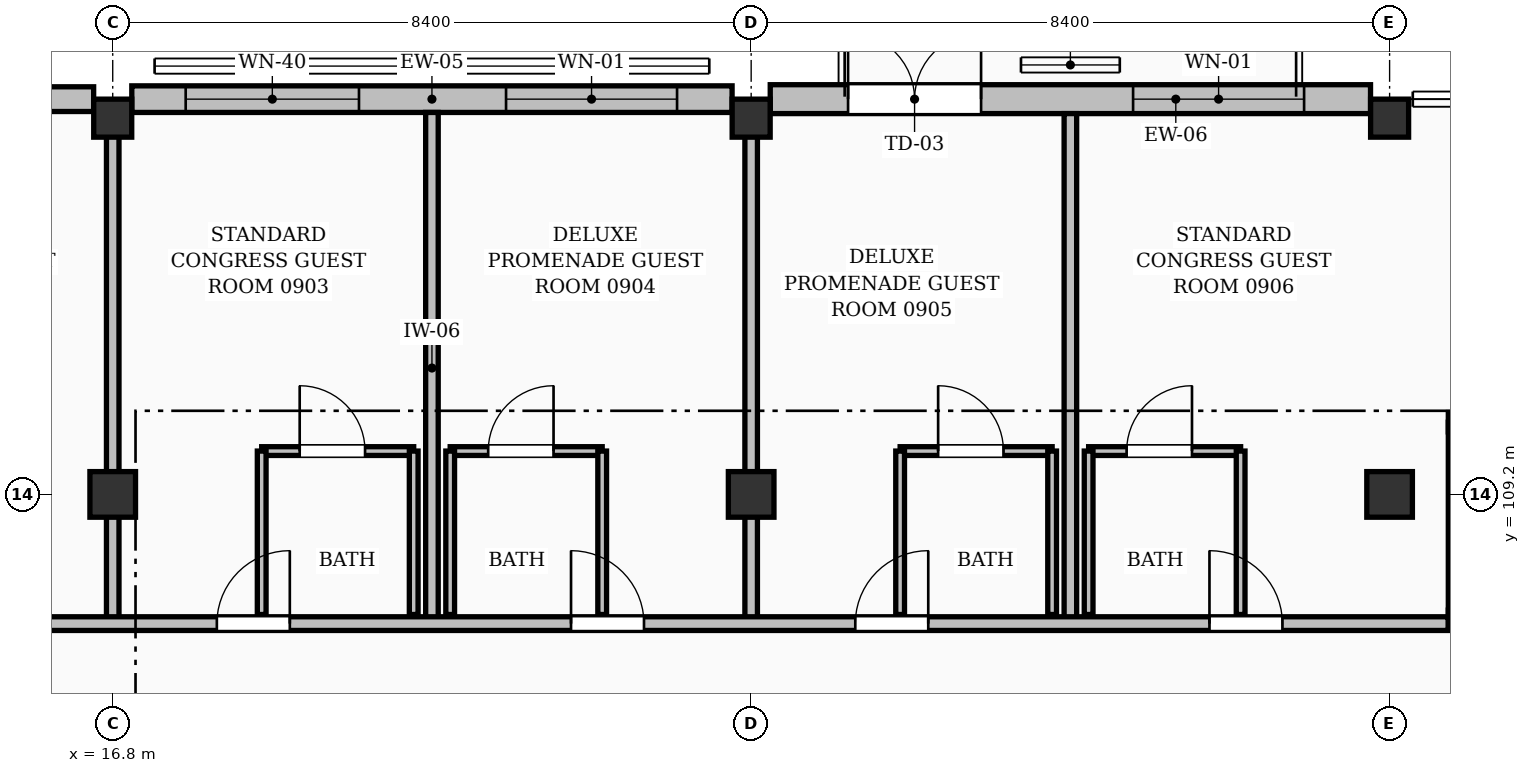
"""IFC4 building model, lengths in metres.
Left out: names, types, materials, properties, quantities, classifications, styles, units other than length and angle.
Written with IfcOpenShell. Run it as: python <this file> out.ifc"""

import sys

from ifc_helpers import new_model, si_unit, direction, frame, frame_2d, origin, origin_2d, place, context, subcontext, project, spatial, rectangle, extrude, element, fill, save


model = new_model("IFC4")
c1 = context("Model", 3, precision=1e-05, world=origin(), true_north=direction((0.0, 1.0)))
c2 = subcontext(c1, "Body", "Model", "MODEL_VIEW")
j1 = project(units=[si_unit("LENGTHUNIT", "METRE"), si_unit("PLANEANGLEUNIT", "RADIAN")], contexts=[c1])
p1 = place(None, origin())
s1 = spatial("IfcSite", under=j1, at=p1, CompositionType="ELEMENT")
p2 = place(p1, origin())
s2 = spatial("IfcBuilding", under=s1, at=p2, CompositionType="ELEMENT")
p3 = place(p2, frame((0.0, 0.0, 31.92)))
s3 = spatial("IfcBuildingStorey", under=s2, at=p3, CompositionType="ELEMENT", Elevation=31.92)
p4 = place(p3, frame((16.8, 109.2, 0.0), z_axis=(0.0, 0.0, 1.0), x_axis=(1.0, 0.0, 0.0)))
e1 = element("IfcColumn", 1, at=p4, inside=s3, PredefinedType="COLUMN", context=c2, shape_type="SweptSolid", body=[
    extrude(rectangle(XDim=0.6, YDim=0.6, at=origin_2d()), origin(), (0.0, 0.0, 1.0), 3.36),
])
p5 = place(p3, frame((16.8, 114.15, 0.0), z_axis=(0.0, 0.0, 1.0), x_axis=(1.0, 0.0, 0.0)))
e2 = element("IfcColumn", 2, at=p5, inside=s3, PredefinedType="COLUMN", context=c2, shape_type="SweptSolid", body=[
    extrude(rectangle(XDim=0.5, YDim=0.5, at=origin_2d()), origin(), (0.0, 0.0, 1.0), 3.36),
])
p6 = place(p3, frame((25.2, 109.2, 0.0), z_axis=(0.0, 0.0, 1.0), x_axis=(1.0, 0.0, 0.0)))
e3 = element("IfcColumn", 3, at=p6, inside=s3, PredefinedType="COLUMN", context=c2, shape_type="SweptSolid", body=[
    extrude(rectangle(XDim=0.6, YDim=0.6, at=origin_2d()), origin(), (0.0, 0.0, 1.0), 3.36),
])
p7 = place(p3, frame((25.2, 114.15, 0.0), z_axis=(0.0, 0.0, 1.0), x_axis=(1.0, 0.0, 0.0)))
e4 = element("IfcColumn", 4, at=p7, inside=s3, PredefinedType="COLUMN", context=c2, shape_type="SweptSolid", body=[
    extrude(rectangle(XDim=0.5, YDim=0.5, at=origin_2d()), origin(), (0.0, 0.0, 1.0), 3.36),
])
p8 = place(p3, frame((33.6, 109.2, 0.0), z_axis=(0.0, 0.0, 1.0), x_axis=(1.0, 0.0, 0.0)))
e5 = element("IfcColumn", 5, at=p8, inside=s3, PredefinedType="COLUMN", context=c2, shape_type="SweptSolid", body=[
    extrude(rectangle(XDim=0.6, YDim=0.6, at=origin_2d()), origin(), (0.0, 0.0, 1.0), 3.36),
])
p9 = place(p3, frame((33.6, 114.15, 0.0), z_axis=(0.0, 0.0, 1.0), x_axis=(1.0, 0.0, 0.0)))
e6 = element("IfcColumn", 6, at=p9, inside=s3, PredefinedType="COLUMN", context=c2, shape_type="SweptSolid", body=[
    extrude(rectangle(XDim=0.5, YDim=0.5, at=origin_2d()), origin(), (0.0, 0.0, 1.0), 3.36),
])
p10 = place(p3, frame((8.651, 114.4, 0.0), z_axis=(0.0, 0.0, 1.0), x_axis=(1.0, 0.0, 0.0)))
e7 = element("IfcWall", 7, at=p10, inside=s3, PredefinedType="SOLIDWALL", context=c2, shape_type="SweptSolid", body=[
    extrude(rectangle(XDim=7.898, YDim=0.325, at=frame_2d((3.949, 0.0))), origin(), (0.0, 0.0, 1.0), 2.474),
])
p11 = place(p10, frame((1.074, 0.0, 0.0)))
e8 = element("IfcOpeningElement", 8, at=p11, cuts=e7, PredefinedType="OPENING", context=c2, shape_type="SweptSolid", body=[
    extrude(rectangle(XDim=1.65, YDim=2.08, at=frame_2d((0.825, 1.04))), frame((0.0, 0.172, 0.0), z_axis=(0.0, -1.0, 0.0), x_axis=(1.0, 0.0, 0.0)), (0.0, 0.0, 1.0), 0.345),
])
p12 = place(p10, frame((4.689, 0.0, 0.25)))
e9 = element("IfcOpeningElement", 9, at=p12, cuts=e7, PredefinedType="OPENING", context=c2, shape_type="SweptSolid", body=[
    extrude(rectangle(XDim=2.42, YDim=1.9, at=frame_2d((1.21, 0.95))), frame((0.0, 0.172, 0.0), z_axis=(0.0, -1.0, 0.0), x_axis=(1.0, 0.0, 0.0)), (0.0, 0.0, 1.0), 0.345),
])
p13 = place(p3, frame((17.051, 114.4, 0.0), z_axis=(0.0, 0.0, 1.0), x_axis=(1.0, 0.0, 0.0)))
e10 = element("IfcWall", 10, at=p13, inside=s3, PredefinedType="SOLIDWALL", context=c2, shape_type="SweptSolid", body=[
    extrude(rectangle(XDim=7.898, YDim=0.35, at=frame_2d((3.949, 0.0))), origin(), (0.0, 0.0, 1.0), 2.474),
])
p14 = place(p13, frame((0.709, 0.0, 0.25)))
e11 = element("IfcOpeningElement", 11, at=p14, cuts=e10, PredefinedType="OPENING", context=c2, shape_type="SweptSolid", body=[
    extrude(rectangle(XDim=2.28, YDim=2.0, at=frame_2d((1.14, 1.0))), frame((0.0, 0.185, 0.0), z_axis=(0.0, -1.0, 0.0), x_axis=(1.0, 0.0, 0.0)), (0.0, 0.0, 1.0), 0.37),
])
p15 = place(p13, frame((4.924, 0.0, 0.25)))
e12 = element("IfcOpeningElement", 12, at=p15, cuts=e10, PredefinedType="OPENING", context=c2, shape_type="SweptSolid", body=[
    extrude(rectangle(XDim=2.25, YDim=1.85, at=frame_2d((1.125, 0.925))), frame((0.0, 0.185, 0.0), z_axis=(0.0, -1.0, 0.0), x_axis=(1.0, 0.0, 0.0)), (0.0, 0.0, 1.0), 0.37),
])
p16 = place(p3, frame((25.451, 114.4, 0.0), z_axis=(0.0, 0.0, 1.0), x_axis=(1.0, 0.0, 0.0)))
e13 = element("IfcWall", 13, at=p16, inside=s3, PredefinedType="SOLIDWALL", context=c2, shape_type="SweptSolid", body=[
    extrude(rectangle(XDim=7.898, YDim=0.38, at=frame_2d((3.949, 0.0))), origin(), (0.0, 0.0, 1.0), 2.474),
])
p17 = place(p16, frame((1.024, 0.0, 0.0)))
e14 = element("IfcOpeningElement", 14, at=p17, cuts=e13, PredefinedType="OPENING", context=c2, shape_type="SweptSolid", body=[
    extrude(rectangle(XDim=1.75, YDim=2.08, at=frame_2d((0.875, 1.04))), frame((0.0, 0.2, 0.0), z_axis=(0.0, -1.0, 0.0), x_axis=(1.0, 0.0, 0.0)), (0.0, 0.0, 1.0), 0.4),
])
p18 = place(p16, frame((4.774, 0.0, 0.25)))
e15 = element("IfcOpeningElement", 15, at=p18, cuts=e13, PredefinedType="OPENING", context=c2, shape_type="SweptSolid", body=[
    extrude(rectangle(XDim=2.25, YDim=1.85, at=frame_2d((1.125, 0.925))), frame((0.0, 0.2, 0.0), z_axis=(0.0, -1.0, 0.0), x_axis=(1.0, 0.0, 0.0)), (0.0, 0.0, 1.0), 0.4),
])
p19 = place(p3, frame((34.373, 107.55, 0.0), z_axis=(0.0, 0.0, 1.0), x_axis=(1.0, 0.0, 0.0)))
e16 = element("IfcWall", 16, at=p19, inside=s3, PredefinedType="SOLIDWALL", context=c2, shape_type="SweptSolid", body=[
    extrude(rectangle(XDim=2.455, YDim=0.255, at=frame_2d((1.228, 0.0))), origin(), (0.0, 0.0, 1.0), 3.1),
])
p20 = place(p19, frame((0.677, 0.0, 0.0)))
e17 = element("IfcOpeningElement", 17, at=p20, cuts=e16, PredefinedType="OPENING", context=c2, shape_type="SweptSolid", body=[
    extrude(rectangle(XDim=1.1, YDim=2.15, at=frame_2d((0.55, 1.075))), frame((0.0, 0.137, 0.0), z_axis=(0.0, -1.0, 0.0), x_axis=(1.0, 0.0, 0.0)), (0.0, 0.0, 1.0), 0.275),
])
p21 = place(p3, frame((34.373, 110.15, 0.0), z_axis=(0.0, 0.0, 1.0), x_axis=(1.0, 0.0, 0.0)))
e18 = element("IfcWall", 18, at=p21, inside=s3, PredefinedType="SOLIDWALL", context=c2, shape_type="SweptSolid", body=[
    extrude(rectangle(XDim=2.455, YDim=0.255, at=frame_2d((1.228, 0.0))), origin(), (0.0, 0.0, 1.0), 3.1),
])
p22 = place(p3, frame((34.5, 107.55, 0.0), z_axis=(0.0, 0.0, 1.0), x_axis=(0.0, 1.0, 0.0)))
e19 = element("IfcWall", 19, at=p22, inside=s3, PredefinedType="SOLIDWALL", context=c2, shape_type="SweptSolid", body=[
    extrude(rectangle(XDim=2.6, YDim=0.255, at=frame_2d((1.3, 0.0))), origin(), (0.0, 0.0, 1.0), 3.1),
])
p23 = place(p3, frame((18.76, 109.77, 0.0), z_axis=(0.0, 0.0, 1.0), x_axis=(1.0, 0.0, 0.0)))
e20 = element("IfcWall", 20, at=p23, inside=s3, PredefinedType="PARTITIONING", context=c2, shape_type="SweptSolid", body=[
    extrude(rectangle(XDim=2.0, YDim=0.115, at=frame_2d((1.0, 0.0))), origin(), (0.0, 0.0, 1.0), 3.1),
])
p24 = place(p23, frame((0.5, 0.0, 0.0)))
e21 = element("IfcOpeningElement", 21, at=p24, cuts=e20, PredefinedType="OPENING", context=c2, shape_type="SweptSolid", body=[
    extrude(rectangle(XDim=0.86, YDim=2.05, at=frame_2d((0.43, 1.025))), frame((0.0, 0.067, 0.0), z_axis=(0.0, -1.0, 0.0), x_axis=(1.0, 0.0, 0.0)), (0.0, 0.0, 1.0), 0.135),
])
p25 = place(p3, frame((18.76, 107.62, 0.0), z_axis=(0.0, 0.0, 1.0), x_axis=(0.0, 1.0, 0.0)))
e22 = element("IfcWall", 22, at=p25, inside=s3, PredefinedType="PARTITIONING", context=c2, shape_type="SweptSolid", body=[
    extrude(rectangle(XDim=2.15, YDim=0.115, at=frame_2d((1.075, 0.0))), origin(), (0.0, 0.0, 1.0), 2.622),
])
p26 = place(p3, frame((20.76, 107.62, 0.0), z_axis=(0.0, 0.0, 1.0), x_axis=(0.0, 1.0, 0.0)))
e23 = element("IfcWall", 23, at=p26, inside=s3, PredefinedType="PARTITIONING", context=c2, shape_type="SweptSolid", body=[
    extrude(rectangle(XDim=2.15, YDim=0.115, at=frame_2d((1.075, 0.0))), origin(), (0.0, 0.0, 1.0), 3.1),
])
p27 = place(p3, frame((21.24, 109.77, 0.0), z_axis=(0.0, 0.0, 1.0), x_axis=(1.0, 0.0, 0.0)))
e24 = element("IfcWall", 24, at=p27, inside=s3, PredefinedType="PARTITIONING", context=c2, shape_type="SweptSolid", body=[
    extrude(rectangle(XDim=2.0, YDim=0.115, at=frame_2d((1.0, 0.0))), origin(), (0.0, 0.0, 1.0), 3.1),
])
p28 = place(p27, frame((0.5, 0.0, 0.0)))
e25 = element("IfcOpeningElement", 25, at=p28, cuts=e24, PredefinedType="OPENING", context=c2, shape_type="SweptSolid", body=[
    extrude(rectangle(XDim=0.86, YDim=2.05, at=frame_2d((0.43, 1.025))), frame((0.0, 0.067, 0.0), z_axis=(0.0, -1.0, 0.0), x_axis=(1.0, 0.0, 0.0)), (0.0, 0.0, 1.0), 0.135),
])
p29 = place(p3, frame((21.24, 107.62, 0.0), z_axis=(0.0, 0.0, 1.0), x_axis=(0.0, 1.0, 0.0)))
e26 = element("IfcWall", 26, at=p29, inside=s3, PredefinedType="PARTITIONING", context=c2, shape_type="SweptSolid", body=[
    extrude(rectangle(XDim=2.15, YDim=0.115, at=frame_2d((1.075, 0.0))), origin(), (0.0, 0.0, 1.0), 3.1),
])
p30 = place(p3, frame((23.24, 107.62, 0.0), z_axis=(0.0, 0.0, 1.0), x_axis=(0.0, 1.0, 0.0)))
e27 = element("IfcWall", 27, at=p30, inside=s3, PredefinedType="PARTITIONING", context=c2, shape_type="SweptSolid", body=[
    extrude(rectangle(XDim=2.15, YDim=0.115, at=frame_2d((1.075, 0.0))), origin(), (0.0, 0.0, 1.0), 2.622),
])
p31 = place(p3, frame((21.0, 107.5, 0.0), z_axis=(0.0, 0.0, 1.0), x_axis=(0.0, 1.0, 0.0)))
e28 = element("IfcWall", 28, at=p31, inside=s3, PredefinedType="PARTITIONING", context=c2, shape_type="SweptSolid", body=[
    extrude(rectangle(XDim=6.725, YDim=0.165, at=frame_2d((3.363, 0.0))), origin(), (0.0, 0.0, 1.0), 3.1),
])
p32 = place(p3, frame((16.8, 107.5, 0.0), z_axis=(0.0, 0.0, 1.0), x_axis=(0.0, 1.0, 0.0)))
e29 = element("IfcWall", 29, at=p32, inside=s3, PredefinedType="PARTITIONING", context=c2, shape_type="SweptSolid", body=[
    extrude(rectangle(XDim=6.55, YDim=0.165, at=frame_2d((3.275, 0.0))), origin(), (0.0, 0.0, 1.0), 2.39),
])
p33 = place(p3, frame((27.16, 109.77, 0.0), z_axis=(0.0, 0.0, 1.0), x_axis=(1.0, 0.0, 0.0)))
e30 = element("IfcWall", 30, at=p33, inside=s3, PredefinedType="PARTITIONING", context=c2, shape_type="SweptSolid", body=[
    extrude(rectangle(XDim=2.0, YDim=0.115, at=frame_2d((1.0, 0.0))), origin(), (0.0, 0.0, 1.0), 3.1),
])
p34 = place(p33, frame((0.5, 0.0, 0.0)))
e31 = element("IfcOpeningElement", 31, at=p34, cuts=e30, PredefinedType="OPENING", context=c2, shape_type="SweptSolid", body=[
    extrude(rectangle(XDim=0.86, YDim=2.05, at=frame_2d((0.43, 1.025))), frame((0.0, 0.067, 0.0), z_axis=(0.0, -1.0, 0.0), x_axis=(1.0, 0.0, 0.0)), (0.0, 0.0, 1.0), 0.135),
])
for number, where, z_axis, x_axis in (
    (32, (27.16, 107.62, 0.0), (0.0, 0.0, 1.0), (0.0, 1.0, 0.0)),
    (33, (29.16, 107.62, 0.0), (0.0, 0.0, 1.0), (0.0, 1.0, 0.0)),
):
    element("IfcWall", number, at=place(p3, frame(where, z_axis=z_axis, x_axis=x_axis)), inside=s3, PredefinedType="PARTITIONING", context=c2, shape_type="SweptSolid", body=[
        extrude(rectangle(XDim=2.15, YDim=0.115, at=frame_2d((1.075, 0.0))), origin(), (0.0, 0.0, 1.0), 3.1),
    ])
p35 = place(p3, frame((29.64, 109.77, 0.0), z_axis=(0.0, 0.0, 1.0), x_axis=(1.0, 0.0, 0.0)))
e34 = element("IfcWall", 34, at=p35, inside=s3, PredefinedType="PARTITIONING", context=c2, shape_type="SweptSolid", body=[
    extrude(rectangle(XDim=2.0, YDim=0.115, at=frame_2d((1.0, 0.0))), origin(), (0.0, 0.0, 1.0), 3.1),
])
p36 = place(p35, frame((0.5, 0.0, 0.0)))
e35 = element("IfcOpeningElement", 35, at=p36, cuts=e34, PredefinedType="OPENING", context=c2, shape_type="SweptSolid", body=[
    extrude(rectangle(XDim=0.86, YDim=2.05, at=frame_2d((0.43, 1.025))), frame((0.0, 0.067, 0.0), z_axis=(0.0, -1.0, 0.0), x_axis=(1.0, 0.0, 0.0)), (0.0, 0.0, 1.0), 0.135),
])
for number, where, z_axis, x_axis in (
    (36, (29.64, 107.62, 0.0), (0.0, 0.0, 1.0), (0.0, 1.0, 0.0)),
    (37, (31.64, 107.62, 0.0), (0.0, 0.0, 1.0), (0.0, 1.0, 0.0)),
):
    element("IfcWall", number, at=place(p3, frame(where, z_axis=z_axis, x_axis=x_axis)), inside=s3, PredefinedType="PARTITIONING", context=c2, shape_type="SweptSolid", body=[
        extrude(rectangle(XDim=2.15, YDim=0.115, at=frame_2d((1.075, 0.0))), origin(), (0.0, 0.0, 1.0), 3.1),
    ])
p37 = place(p3, frame((29.4, 107.5, 0.0), z_axis=(0.0, 0.0, 1.0), x_axis=(0.0, 1.0, 0.0)))
e38 = element("IfcWall", 38, at=p37, inside=s3, PredefinedType="PARTITIONING", context=c2, shape_type="SweptSolid", body=[
    extrude(rectangle(XDim=6.71, YDim=0.165, at=frame_2d((3.355, 0.0))), origin(), (0.0, 0.0, 1.0), 3.1),
])
p38 = place(p3, frame((25.2, 107.5, 0.0), z_axis=(0.0, 0.0, 1.0), x_axis=(0.0, 1.0, 0.0)))
e39 = element("IfcWall", 39, at=p38, inside=s3, PredefinedType="PARTITIONING", context=c2, shape_type="SweptSolid", body=[
    extrude(rectangle(XDim=6.55, YDim=0.165, at=frame_2d((3.275, 0.0))), origin(), (0.0, 0.0, 1.0), 2.39),
])
p39 = place(p3, frame((8.575, 107.5, 0.0), z_axis=(0.0, 0.0, 1.0), x_axis=(1.0, 0.0, 0.0)))
e40 = element("IfcWall", 40, at=p39, inside=s3, PredefinedType="PARTITIONING", context=c2, shape_type="SweptSolid", body=[
    extrude(rectangle(XDim=25.795, YDim=0.18, at=frame_2d((12.897, 0.0))), origin(), (0.0, 0.0, 1.0), 3.1),
])
p40 = place(p39, frame((1.195, 0.0, 0.0)))
e41 = element("IfcOpeningElement", 41, at=p40, cuts=e40, PredefinedType="OPENING", context=c2, shape_type="SweptSolid", body=[
    extrude(rectangle(XDim=0.96, YDim=2.15, at=frame_2d((0.48, 1.075))), frame((0.0, 0.1, 0.0), z_axis=(0.0, -1.0, 0.0), x_axis=(1.0, 0.0, 0.0)), (0.0, 0.0, 1.0), 0.2),
])
p41 = place(p39, frame((5.855, 0.0, 0.0)))
e42 = element("IfcOpeningElement", 42, at=p41, cuts=e40, PredefinedType="OPENING", context=c2, shape_type="SweptSolid", body=[
    extrude(rectangle(XDim=0.96, YDim=2.15, at=frame_2d((0.48, 1.075))), frame((0.0, 0.1, 0.0), z_axis=(0.0, -1.0, 0.0), x_axis=(1.0, 0.0, 0.0)), (0.0, 0.0, 1.0), 0.2),
])
p42 = place(p39, frame((9.595, 0.0, 0.0)))
e43 = element("IfcOpeningElement", 43, at=p42, cuts=e40, PredefinedType="OPENING", context=c2, shape_type="SweptSolid", body=[
    extrude(rectangle(XDim=0.96, YDim=2.15, at=frame_2d((0.48, 1.075))), frame((0.0, 0.1, 0.0), z_axis=(0.0, -1.0, 0.0), x_axis=(1.0, 0.0, 0.0)), (0.0, 0.0, 1.0), 0.2),
])
p43 = place(p39, frame((14.255, 0.0, 0.0)))
e44 = element("IfcOpeningElement", 44, at=p43, cuts=e40, PredefinedType="OPENING", context=c2, shape_type="SweptSolid", body=[
    extrude(rectangle(XDim=0.96, YDim=2.15, at=frame_2d((0.48, 1.075))), frame((0.0, 0.1, 0.0), z_axis=(0.0, -1.0, 0.0), x_axis=(1.0, 0.0, 0.0)), (0.0, 0.0, 1.0), 0.2),
])
p44 = place(p39, frame((17.995, 0.0, 0.0)))
e45 = element("IfcOpeningElement", 45, at=p44, cuts=e40, PredefinedType="OPENING", context=c2, shape_type="SweptSolid", body=[
    extrude(rectangle(XDim=0.96, YDim=2.15, at=frame_2d((0.48, 1.075))), frame((0.0, 0.1, 0.0), z_axis=(0.0, -1.0, 0.0), x_axis=(1.0, 0.0, 0.0)), (0.0, 0.0, 1.0), 0.2),
])
p45 = place(p39, frame((22.655, 0.0, 0.0)))
e46 = element("IfcOpeningElement", 46, at=p45, cuts=e40, PredefinedType="OPENING", context=c2, shape_type="SweptSolid", body=[
    extrude(rectangle(XDim=0.96, YDim=2.15, at=frame_2d((0.48, 1.075))), frame((0.0, 0.1, 0.0), z_axis=(0.0, -1.0, 0.0), x_axis=(1.0, 0.0, 0.0)), (0.0, 0.0, 1.0), 0.2),
])
p46 = place(p14, origin())
e47 = element("IfcWindow", 47, at=p46, inside=s3, PartitioningType="DOUBLE_PANEL_VERTICAL", PredefinedType="WINDOW", context=c2, shape_type="SweptSolid", body=[
    extrude(rectangle(XDim=2.28, YDim=2.0, at=frame_2d((1.14, 1.0))), frame((0.0, 0.03, 0.0), z_axis=(0.0, -1.0, 0.0), x_axis=(1.0, 0.0, 0.0)), (0.0, 0.0, 1.0), 0.06),
])
fill(e11, e47)
p47 = place(p15, origin())
e48 = element("IfcWindow", 48, at=p47, inside=s3, PartitioningType="DOUBLE_PANEL_VERTICAL", PredefinedType="WINDOW", context=c2, shape_type="SweptSolid", body=[
    extrude(rectangle(XDim=2.25, YDim=1.85, at=frame_2d((1.125, 0.925))), frame((0.0, 0.03, 0.0), z_axis=(0.0, -1.0, 0.0), x_axis=(1.0, 0.0, 0.0)), (0.0, 0.0, 1.0), 0.06),
])
fill(e12, e48)
p48 = place(p17, origin())
e49 = element("IfcDoor", 49, at=p48, inside=s3, OperationType="DOUBLE_DOOR_SINGLE_SWING", PredefinedType="DOOR", context=c2, shape_type="SweptSolid", body=[
    extrude(rectangle(XDim=1.75, YDim=2.08, at=frame_2d((0.875, 1.04))), frame((0.0, 0.025, 0.0), z_axis=(0.0, -1.0, 0.0), x_axis=(1.0, 0.0, 0.0)), (0.0, 0.0, 1.0), 0.05),
])
fill(e14, e49)
p49 = place(p18, origin())
e50 = element("IfcWindow", 50, at=p49, inside=s3, PartitioningType="DOUBLE_PANEL_VERTICAL", PredefinedType="WINDOW", context=c2, shape_type="SweptSolid", body=[
    extrude(rectangle(XDim=2.25, YDim=1.85, at=frame_2d((1.125, 0.925))), frame((0.0, 0.03, 0.0), z_axis=(0.0, -1.0, 0.0), x_axis=(1.0, 0.0, 0.0)), (0.0, 0.0, 1.0), 0.06),
])
fill(e15, e50)
p50 = place(p24, origin())
e51 = element("IfcDoor", 51, at=p50, inside=s3, OperationType="SINGLE_SWING_LEFT", PredefinedType="DOOR", context=c2, shape_type="SweptSolid", body=[
    extrude(rectangle(XDim=0.86, YDim=2.05, at=frame_2d((0.43, 1.025))), frame((0.0, 0.025, 0.0), z_axis=(0.0, -1.0, 0.0), x_axis=(1.0, 0.0, 0.0)), (0.0, 0.0, 1.0), 0.05),
])
fill(e21, e51)
p51 = place(p28, origin())
e52 = element("IfcDoor", 52, at=p51, inside=s3, OperationType="SINGLE_SWING_RIGHT", PredefinedType="DOOR", context=c2, shape_type="SweptSolid", body=[
    extrude(rectangle(XDim=0.86, YDim=2.05, at=frame_2d((0.43, 1.025))), frame((0.0, 0.025, 0.0), z_axis=(0.0, -1.0, 0.0), x_axis=(1.0, 0.0, 0.0)), (0.0, 0.0, 1.0), 0.05),
])
fill(e25, e52)
p52 = place(p34, origin())
e53 = element("IfcDoor", 53, at=p52, inside=s3, OperationType="SINGLE_SWING_LEFT", PredefinedType="DOOR", context=c2, shape_type="SweptSolid", body=[
    extrude(rectangle(XDim=0.86, YDim=2.05, at=frame_2d((0.43, 1.025))), frame((0.0, 0.025, 0.0), z_axis=(0.0, -1.0, 0.0), x_axis=(1.0, 0.0, 0.0)), (0.0, 0.0, 1.0), 0.05),
])
fill(e31, e53)
p53 = place(p36, origin())
e54 = element("IfcDoor", 54, at=p53, inside=s3, OperationType="SINGLE_SWING_RIGHT", PredefinedType="DOOR", context=c2, shape_type="SweptSolid", body=[
    extrude(rectangle(XDim=0.86, YDim=2.05, at=frame_2d((0.43, 1.025))), frame((0.0, 0.025, 0.0), z_axis=(0.0, -1.0, 0.0), x_axis=(1.0, 0.0, 0.0)), (0.0, 0.0, 1.0), 0.05),
])
fill(e35, e54)
p54 = place(p42, origin())
e55 = element("IfcDoor", 55, at=p54, inside=s3, OperationType="SINGLE_SWING_RIGHT", PredefinedType="DOOR", context=c2, shape_type="SweptSolid", body=[
    extrude(rectangle(XDim=0.96, YDim=2.15, at=frame_2d((0.48, 1.075))), frame((0.0, 0.025, 0.0), z_axis=(0.0, -1.0, 0.0), x_axis=(1.0, 0.0, 0.0)), (0.0, 0.0, 1.0), 0.05),
])
fill(e43, e55)
p55 = place(p43, origin())
e56 = element("IfcDoor", 56, at=p55, inside=s3, OperationType="SINGLE_SWING_LEFT", PredefinedType="DOOR", context=c2, shape_type="SweptSolid", body=[
    extrude(rectangle(XDim=0.96, YDim=2.15, at=frame_2d((0.48, 1.075))), frame((0.0, 0.025, 0.0), z_axis=(0.0, -1.0, 0.0), x_axis=(1.0, 0.0, 0.0)), (0.0, 0.0, 1.0), 0.05),
])
fill(e44, e56)
p56 = place(p44, origin())
e57 = element("IfcDoor", 57, at=p56, inside=s3, OperationType="SINGLE_SWING_RIGHT", PredefinedType="DOOR", context=c2, shape_type="SweptSolid", body=[
    extrude(rectangle(XDim=0.96, YDim=2.15, at=frame_2d((0.48, 1.075))), frame((0.0, 0.025, 0.0), z_axis=(0.0, -1.0, 0.0), x_axis=(1.0, 0.0, 0.0)), (0.0, 0.0, 1.0), 0.05),
])
fill(e45, e57)
p57 = place(p45, origin())
e58 = element("IfcDoor", 58, at=p57, inside=s3, OperationType="SINGLE_SWING_LEFT", PredefinedType="DOOR", context=c2, shape_type="SweptSolid", body=[
    extrude(rectangle(XDim=0.96, YDim=2.15, at=frame_2d((0.48, 1.075))), frame((0.0, 0.025, 0.0), z_axis=(0.0, -1.0, 0.0), x_axis=(1.0, 0.0, 0.0)), (0.0, 0.0, 1.0), 0.05),
])
fill(e46, e58)
save(model, sys.argv[1])
